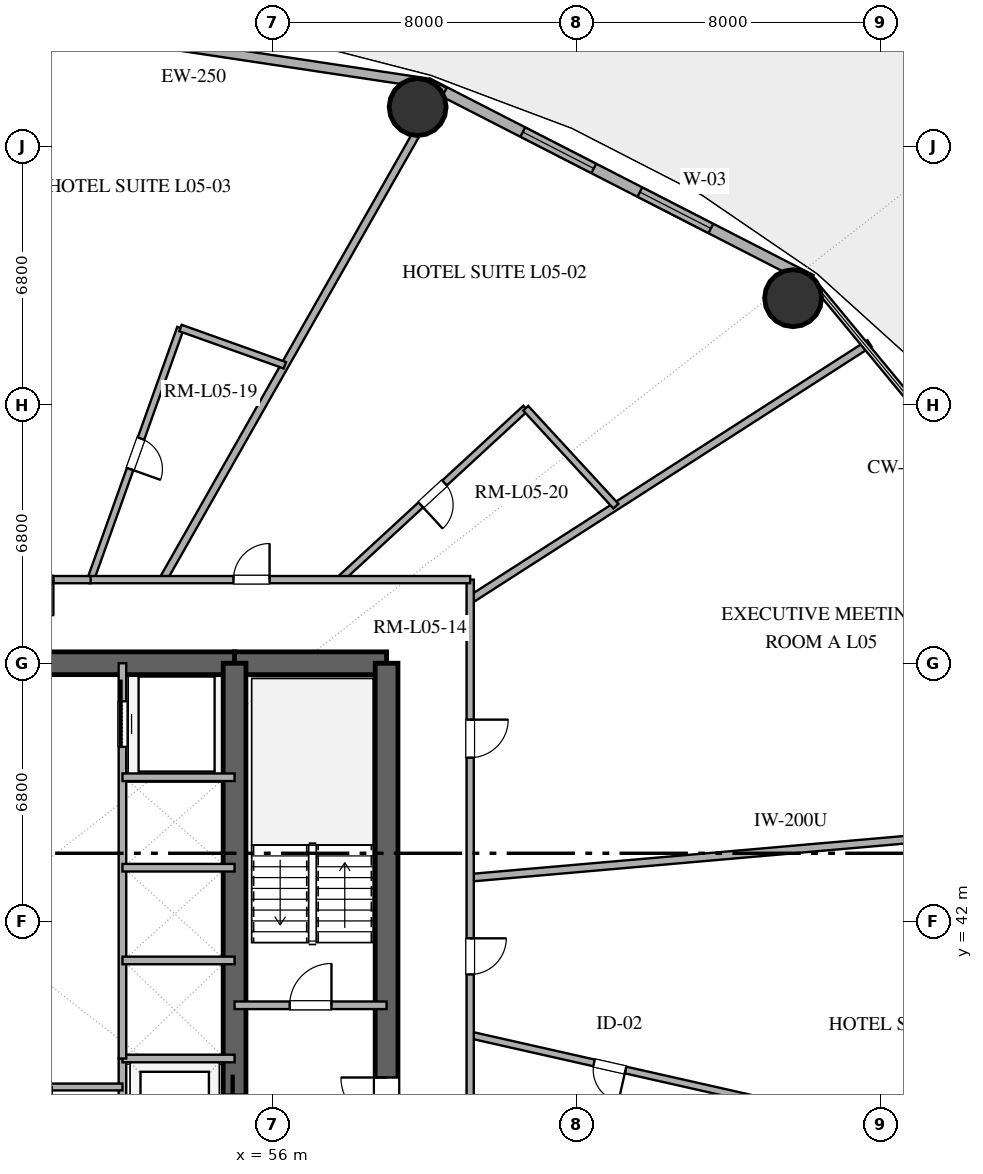
"""IFC4 building model, lengths in metres.
Left out: names, types, materials, properties, quantities, classifications, styles, units other than length and angle.
Written with IfcOpenShell. Run it as: python <this file> out.ifc"""

import sys

from ifc_helpers import new_model, si_unit, direction, frame, frame_2d, origin, origin_2d, place, context, subcontext, project, spatial, rectangle, hollow_circle, extrude, element, fill, save


model = new_model("IFC4")
c1 = context("Model", 3, precision=1e-05, world=origin(), true_north=direction((0.0, 1.0)))
c2 = subcontext(c1, "Body", "Model", "MODEL_VIEW")
j1 = project(units=[si_unit("LENGTHUNIT", "METRE"), si_unit("PLANEANGLEUNIT", "RADIAN")], contexts=[c1])
p1 = place(None, origin())
s1 = spatial("IfcSite", under=j1, at=p1, CompositionType="ELEMENT")
p2 = place(p1, origin())
s2 = spatial("IfcBuilding", under=s1, at=p2, CompositionType="ELEMENT")
p3 = place(p2, frame((0.0, 0.0, 28.2)))
s3 = spatial("IfcBuildingStorey", under=s2, at=p3, CompositionType="ELEMENT", Elevation=28.2)
p4 = place(p3, frame((41.0, 48.8, 0.0), z_axis=(0.0, 0.0, 1.0), x_axis=(1.0, 0.0, 0.0)))
e1 = element("IfcWall", 1, at=p4, inside=s3, PredefinedType="SHEAR", context=c2, shape_type="SweptSolid", body=[
    extrude(rectangle(XDim=14.0, YDim=0.6, at=frame_2d((7.0, 0.0))), origin(), (0.0, 0.0, 1.0), 3.38),
])
p5 = place(p4, frame((6.1, 0.0, 0.0)))
e2 = element("IfcOpeningElement", 2, at=p5, cuts=e1, PredefinedType="OPENING", context=c2, shape_type="SweptSolid", body=[
    extrude(rectangle(XDim=1.8, YDim=2.25, at=frame_2d((0.9, 1.125))), frame((0.0, 0.31, 0.0), z_axis=(0.0, -1.0, 0.0), x_axis=(1.0, 0.0, 0.0)), (0.0, 0.0, 1.0), 0.62),
])
p6 = place(p3, frame((55.0, 48.8, 0.0), z_axis=(0.0, 0.0, 1.0), x_axis=(1.0, 0.0, 0.0)))
e3 = element("IfcWall", 3, at=p6, inside=s3, PredefinedType="SHEAR", context=c2, shape_type="SweptSolid", body=[
    extrude(rectangle(XDim=4.0, YDim=0.6, at=frame_2d((2.0, 0.0))), origin(), (0.0, 0.0, 1.0), 3.38),
])
p7 = place(p3, frame((59.0, 35.2, 0.0), z_axis=(0.0, 0.0, 1.0), x_axis=(0.0, 1.0, 0.0)))
e4 = element("IfcWall", 4, at=p7, inside=s3, PredefinedType="SHEAR", context=c2, shape_type="SweptSolid", body=[
    extrude(rectangle(XDim=13.6, YDim=0.6, at=frame_2d((6.8, 0.0))), origin(), (0.0, 0.0, 1.0), 3.38),
])
p8 = place(p7, frame((1.5, 0.0, 0.0)))
e5 = element("IfcOpeningElement", 5, at=p8, cuts=e4, PredefinedType="OPENING", context=c2, shape_type="SweptSolid", body=[
    extrude(rectangle(XDim=1.2, YDim=2.15, at=frame_2d((0.6, 1.075))), frame((0.0, 0.31, 0.0), z_axis=(0.0, -1.0, 0.0), x_axis=(1.0, 0.0, 0.0)), (0.0, 0.0, 1.0), 0.62),
])
p9 = place(p3, frame((55.0, 35.2, 0.0), z_axis=(0.0, 0.0, 1.0), x_axis=(0.0, 1.0, 0.0)))
e6 = element("IfcWall", 6, at=p9, inside=s3, PredefinedType="SHEAR", context=c2, shape_type="SweptSolid", body=[
    extrude(rectangle(XDim=13.6, YDim=0.6, at=frame_2d((6.8, 0.0))), origin(), (0.0, 0.0, 1.0), 3.38),
])
p10 = place(p9, frame((1.15, 0.0, 0.0)))
e7 = element("IfcOpeningElement", 7, at=p10, cuts=e6, PredefinedType="OPENING", context=c2, shape_type="SweptSolid", body=[
    extrude(rectangle(XDim=1.1, YDim=2.2, at=frame_2d((0.55, 1.1))), frame((0.0, 0.31, 0.0), z_axis=(0.0, -1.0, 0.0), x_axis=(1.0, 0.0, 0.0)), (0.0, 0.0, 1.0), 0.62),
])
for number, where, z_axis, x_axis in (
    (8, (69.697, 58.405, 0.0), (0.0, 0.0, 1.0), (1.0, 0.0, 0.0)),
    (9, (59.818, 63.434, 0.0), (0.0, 0.0, 1.0), (1.0, 0.0, 0.0)),
):
    element("IfcColumn", number, at=place(p3, frame(where, z_axis=z_axis, x_axis=x_axis)), inside=s3, PredefinedType="COLUMN", context=c2, shape_type="SweptSolid", body=[
        extrude(hollow_circle(Radius=0.75, WallThickness=0.04, at=origin_2d()), origin(), (0.0, 0.0, 1.0), 3.38),
    ])
p11 = place(p3, frame((70.174, 58.886, 0.0), z_axis=(0.0, 0.0, 1.0), x_axis=(-0.889853976658, 0.456245438581, 0.0)))
e10 = element("IfcWall", 10, at=p11, inside=s3, PredefinedType="SOLIDWALL", context=c2, shape_type="SweptSolid", body=[
    extrude(rectangle(XDim=11.346, YDim=0.28, at=frame_2d((5.673, 0.0))), origin(), (0.0, 0.0, 1.0), 3.38),
])
p12 = place(p11, frame((2.967, 0.0, 0.85)))
e11 = element("IfcOpeningElement", 11, at=p12, cuts=e10, PredefinedType="OPENING", context=c2, shape_type="SweptSolid", body=[
    extrude(rectangle(XDim=2.1, YDim=2.2, at=frame_2d((1.05, 1.1))), frame((0.0, 0.15, 0.0), z_axis=(0.0, -1.0, 0.0), x_axis=(1.0, 0.0, 0.0)), (0.0, 0.0, 1.0), 0.3),
])
p13 = place(p11, frame((6.429, 0.0, 0.85)))
e12 = element("IfcOpeningElement", 12, at=p13, cuts=e10, PredefinedType="OPENING", context=c2, shape_type="SweptSolid", body=[
    extrude(rectangle(XDim=2.1, YDim=2.2, at=frame_2d((1.05, 1.1))), frame((0.0, 0.15, 0.0), z_axis=(0.0, -1.0, 0.0), x_axis=(1.0, 0.0, 0.0)), (0.0, 0.0, 1.0), 0.3),
])
p14 = place(p3, frame((60.078, 64.062, 0.0), z_axis=(0.0, 0.0, 1.0), x_axis=(-0.988864835849, 0.148816452121, 0.0)))
e13 = element("IfcWall", 13, at=p14, inside=s3, PredefinedType="SOLIDWALL", context=c2, shape_type="SweptSolid", body=[
    extrude(rectangle(XDim=12.214, YDim=0.25, at=frame_2d((6.107, 0.0))), origin(), (0.0, 0.0, 1.0), 3.38),
])
p15 = place(p14, frame((8.195, 0.0, 1.42)))
e14 = element("IfcOpeningElement", 14, at=p15, cuts=e13, PredefinedType="OPENING", context=c2, shape_type="SweptSolid", body=[
    extrude(rectangle(XDim=1.0, YDim=1.05, at=frame_2d((0.5, 0.525))), frame((0.0, 0.135, 0.0), z_axis=(0.0, -1.0, 0.0), x_axis=(1.0, 0.0, 0.0)), (0.0, 0.0, 1.0), 0.27),
])
p16 = place(p3, frame((55.0, 39.8, 0.0), z_axis=(0.0, 0.0, 1.0), x_axis=(1.0, 0.0, 0.0)))
e15 = element("IfcWall", 15, at=p16, inside=s3, PredefinedType="SOLIDWALL", context=c2, shape_type="SweptSolid", body=[
    extrude(rectangle(XDim=4.0, YDim=0.2, at=frame_2d((2.0, 0.0))), origin(), (0.0, 0.0, 1.0), 2.74),
])
p17 = place(p16, frame((1.45, 0.0, 0.0)))
e16 = element("IfcOpeningElement", 16, at=p17, cuts=e15, PredefinedType="OPENING", context=c2, shape_type="SweptSolid", body=[
    extrude(rectangle(XDim=1.1, YDim=2.15, at=frame_2d((0.55, 1.075))), frame((0.0, 0.11, 0.0), z_axis=(0.0, -1.0, 0.0), x_axis=(1.0, 0.0, 0.0)), (0.0, 0.0, 1.0), 0.22),
])
p18 = place(p3, frame((52.05, 35.2, 0.0), z_axis=(0.0, 0.0, 1.0), x_axis=(0.0, 1.0, 0.0)))
e17 = element("IfcWall", 17, at=p18, inside=s3, PredefinedType="SOLIDWALL", context=c2, shape_type="SweptSolid", body=[
    extrude(rectangle(XDim=3.2, YDim=0.2, at=frame_2d((1.6, 0.0))), origin(), (0.0, 0.0, 1.0), 2.74),
])
p19 = place(p3, frame((52.05, 38.4, 0.0), z_axis=(0.0, 0.0, 1.0), x_axis=(1.0, 0.0, 0.0)))
e18 = element("IfcWall", 18, at=p19, inside=s3, PredefinedType="SOLIDWALL", context=c2, shape_type="SweptSolid", body=[
    extrude(rectangle(XDim=2.95, YDim=0.2, at=frame_2d((1.475, 0.0))), origin(), (0.0, 0.0, 1.0), 2.74),
])
p20 = place(p3, frame((52.05, 38.4, 0.0), z_axis=(0.0, 0.0, 1.0), x_axis=(0.0, 1.0, 0.0)))
e19 = element("IfcWall", 19, at=p20, inside=s3, PredefinedType="SOLIDWALL", context=c2, shape_type="SweptSolid", body=[
    extrude(rectangle(XDim=10.4, YDim=0.2, at=frame_2d((5.2, 0.0))), origin(), (0.0, 0.0, 1.0), 2.74),
])
p21 = place(p20, frame((8.2, 0.0, 0.0)))
e20 = element("IfcOpeningElement", 20, at=p21, cuts=e19, PredefinedType="OPENING", context=c2, shape_type="SweptSolid", body=[
    extrude(rectangle(XDim=1.2, YDim=2.2, at=frame_2d((0.6, 1.1))), frame((0.0, 0.11, 0.0), z_axis=(0.0, -1.0, 0.0), x_axis=(1.0, 0.0, 0.0)), (0.0, 0.0, 1.0), 0.22),
])
for number, where, z_axis, x_axis in (
    (21, (52.05, 40.98, 0.0), (0.0, 0.0, 1.0), (1.0, 0.0, 0.0)),
    (22, (52.05, 43.42, 0.0), (0.0, 0.0, 1.0), (1.0, 0.0, 0.0)),
    (23, (52.05, 45.8, 0.0), (0.0, 0.0, 1.0), (1.0, 0.0, 0.0)),
):
    element("IfcWall", number, at=place(p3, frame(where, z_axis=z_axis, x_axis=x_axis)), inside=s3, PredefinedType="SOLIDWALL", context=c2, shape_type="SweptSolid", body=[
        extrude(rectangle(XDim=2.95, YDim=0.2, at=frame_2d((1.475, 0.0))), origin(), (0.0, 0.0, 1.0), 2.74),
    ])
p22 = place(p3, frame((50.1, 37.65, 0.0), z_axis=(0.0, 0.0, 1.0), x_axis=(1.0, 0.0, 0.0)))
e24 = element("IfcWall", 24, at=p22, inside=s3, PredefinedType="PLUMBINGWALL", context=c2, shape_type="SweptSolid", body=[
    extrude(rectangle(XDim=1.95, YDim=0.18, at=frame_2d((0.975, 0.0))), origin(), (0.0, 0.0, 1.0), 2.74),
])
p23 = place(p3, frame((61.2, 43.155, 0.0), z_axis=(0.0, 0.0, 1.0), x_axis=(0.996194943742, 0.087152934912, 0.0)))
e25 = element("IfcWall", 25, at=p23, inside=s3, PredefinedType="PARTITIONING", context=c2, shape_type="SweptSolid", body=[
    extrude(rectangle(XDim=17.071, YDim=0.2, at=frame_2d((8.536, 0.0))), origin(), (0.0, 0.0, 1.0), 2.74),
])
p24 = place(p3, frame((53.116, 51.0, 0.0), z_axis=(0.0, 0.0, 1.0), x_axis=(0.494167535405, 0.869366693031, 0.0)))
e26 = element("IfcWall", 26, at=p24, inside=s3, PredefinedType="PARTITIONING", context=c2, shape_type="SweptSolid", body=[
    extrude(rectangle(XDim=14.934, YDim=0.2, at=frame_2d((7.467, 0.0))), origin(), (0.0, 0.0, 1.0), 2.74),
])
p25 = place(p3, frame((61.2, 50.472, 0.0), z_axis=(0.0, 0.0, 1.0), x_axis=(0.841576538847, 0.540137879863, 0.0)))
e27 = element("IfcWall", 27, at=p25, inside=s3, PredefinedType="PARTITIONING", context=c2, shape_type="SweptSolid", body=[
    extrude(rectangle(XDim=12.487, YDim=0.2, at=frame_2d((6.244, 0.0))), origin(), (0.0, 0.0, 1.0), 2.74),
])
p26 = place(p3, frame((68.547, 37.361, 0.0), z_axis=(0.0, 0.0, 1.0), x_axis=(-0.975442349969, 0.220254902072, 0.0)))
e28 = element("IfcWall", 28, at=p26, inside=s3, PredefinedType="PLUMBINGWALL", context=c2, shape_type="SweptSolid", body=[
    extrude(rectangle(XDim=7.532, YDim=0.18, at=frame_2d((3.766, 0.0))), origin(), (0.0, 0.0, 1.0), 2.74),
])
p27 = place(p26, frame((3.341, 0.0, 0.0)))
e29 = element("IfcOpeningElement", 29, at=p27, cuts=e28, PredefinedType="OPENING", context=c2, shape_type="SweptSolid", body=[
    extrude(rectangle(XDim=0.85, YDim=2.1, at=frame_2d((0.425, 1.05))), frame((0.0, 0.1, 0.0), z_axis=(0.0, -1.0, 0.0), x_axis=(1.0, 0.0, 0.0)), (0.0, 0.0, 1.0), 0.2),
])
p28 = place(p3, frame((61.2, 51.0, 0.0), z_axis=(0.0, 0.0, 1.0), x_axis=(0.0, -1.0, 0.0)))
e30 = element("IfcWall", 30, at=p28, inside=s3, PredefinedType="PARTITIONING", context=c2, shape_type="SweptSolid", body=[
    extrude(rectangle(XDim=14.554, YDim=0.19, at=frame_2d((7.277, 0.0))), origin(), (0.0, 0.0, 1.0), 2.74),
])
p29 = place(p28, frame((3.684, 0.0, 0.0)))
e31 = element("IfcOpeningElement", 31, at=p29, cuts=e30, PredefinedType="OPENING", context=c2, shape_type="SweptSolid", body=[
    extrude(rectangle(XDim=1.0, YDim=2.2, at=frame_2d((0.5, 1.1))), frame((0.0, 0.105, 0.0), z_axis=(0.0, -1.0, 0.0), x_axis=(1.0, 0.0, 0.0)), (0.0, 0.0, 1.0), 0.21),
])
p30 = place(p28, frame((9.438, 0.0, 0.0)))
e32 = element("IfcOpeningElement", 32, at=p30, cuts=e30, PredefinedType="OPENING", context=c2, shape_type="SweptSolid", body=[
    extrude(rectangle(XDim=0.95, YDim=2.15, at=frame_2d((0.475, 1.075))), frame((0.0, 0.105, 0.0), z_axis=(0.0, -1.0, 0.0), x_axis=(1.0, 0.0, 0.0)), (0.0, 0.0, 1.0), 0.21),
])
p31 = place(p3, frame((53.576, 57.621, 0.0), z_axis=(0.0, 0.0, 1.0), x_axis=(-0.336213191961, -0.941785904307, 0.0)))
e33 = element("IfcWall", 33, at=p31, inside=s3, PredefinedType="PLUMBINGWALL", context=c2, shape_type="SweptSolid", body=[
    extrude(rectangle(XDim=7.03, YDim=0.18, at=frame_2d((3.515, 0.0))), origin(), (0.0, 0.0, 1.0), 2.74),
])
p32 = place(p31, frame((3.09, 0.0, 0.0)))
e34 = element("IfcOpeningElement", 34, at=p32, cuts=e33, PredefinedType="OPENING", context=c2, shape_type="SweptSolid", body=[
    extrude(rectangle(XDim=0.85, YDim=2.1, at=frame_2d((0.425, 1.05))), frame((0.0, 0.1, 0.0), z_axis=(0.0, -1.0, 0.0), x_axis=(1.0, 0.0, 0.0)), (0.0, 0.0, 1.0), 0.2),
])
p33 = place(p3, frame((62.66, 55.51, 0.0), z_axis=(0.0, 0.0, 1.0), x_axis=(-0.735369975398, -0.67766584633, 0.0)))
e35 = element("IfcWall", 35, at=p33, inside=s3, PredefinedType="PLUMBINGWALL", context=c2, shape_type="SweptSolid", body=[
    extrude(rectangle(XDim=6.655, YDim=0.18, at=frame_2d((3.328, 0.0))), origin(), (0.0, 0.0, 1.0), 2.74),
])
p34 = place(p33, frame((2.903, 0.0, 0.0)))
e36 = element("IfcOpeningElement", 36, at=p34, cuts=e35, PredefinedType="OPENING", context=c2, shape_type="SweptSolid", body=[
    extrude(rectangle(XDim=0.85, YDim=2.1, at=frame_2d((0.425, 1.05))), frame((0.0, 0.1, 0.0), z_axis=(0.0, -1.0, 0.0), x_axis=(1.0, 0.0, 0.0)), (0.0, 0.0, 1.0), 0.2),
])
p35 = place(p3, frame((51.179, 51.0, 0.0), z_axis=(0.0, 0.0, 1.0), x_axis=(1.0, 0.0, 0.0)))
e37 = element("IfcWall", 37, at=p35, inside=s3, PredefinedType="PARTITIONING", context=c2, shape_type="SweptSolid", body=[
    extrude(rectangle(XDim=10.021, YDim=0.19, at=frame_2d((5.01, 0.0))), origin(), (0.0, 0.0, 1.0), 2.74),
])
p36 = place(p35, frame((3.792, 0.0, 0.0)))
e38 = element("IfcOpeningElement", 38, at=p36, cuts=e37, PredefinedType="OPENING", context=c2, shape_type="SweptSolid", body=[
    extrude(rectangle(XDim=0.95, YDim=2.15, at=frame_2d((0.475, 1.075))), frame((0.0, 0.105, 0.0), z_axis=(0.0, -1.0, 0.0), x_axis=(1.0, 0.0, 0.0)), (0.0, 0.0, 1.0), 0.21),
])
p37 = place(p3, frame((65.035, 52.933, 0.0), z_axis=(0.0, 0.0, 1.0), x_axis=(-0.677675106239, 0.735361442002, 0.0)))
e39 = element("IfcWall", 39, at=p37, inside=s3, PredefinedType="PLUMBINGWALL", context=c2, shape_type="SweptSolid", body=[
    extrude(rectangle(XDim=3.504, YDim=0.18, at=frame_2d((1.752, 0.0))), origin(), (0.0, 0.0, 1.0), 2.74),
])
p38 = place(p3, frame((56.322, 56.64, 0.0), z_axis=(0.0, 0.0, 1.0), x_axis=(-0.94177979862, 0.336230294457, 0.0)))
e40 = element("IfcWall", 40, at=p38, inside=s3, PredefinedType="PLUMBINGWALL", context=c2, shape_type="SweptSolid", body=[
    extrude(rectangle(XDim=2.915, YDim=0.18, at=frame_2d((1.458, 0.0))), origin(), (0.0, 0.0, 1.0), 2.74),
])
p39 = place(p3, frame((51.213, 51.0, 0.0), z_axis=(0.0, 0.0, 1.0), x_axis=(-1.0, 0.0, 0.0)))
e41 = element("IfcWall", 41, at=p39, inside=s3, PredefinedType="PARTITIONING", context=c2, shape_type="SweptSolid", body=[
    extrude(rectangle(XDim=2.911, YDim=0.19, at=frame_2d((1.455, 0.0))), origin(), (0.0, 0.0, 1.0), 2.74),
])
p40 = place(p39, frame((0.98, 0.0, 0.0)))
e42 = element("IfcOpeningElement", 42, at=p40, cuts=e41, PredefinedType="OPENING", context=c2, shape_type="SweptSolid", body=[
    extrude(rectangle(XDim=0.95, YDim=2.15, at=frame_2d((0.475, 1.075))), frame((0.0, 0.105, 0.0), z_axis=(0.0, -1.0, 0.0), x_axis=(1.0, 0.0, 0.0)), (0.0, 0.0, 1.0), 0.21),
])
p41 = place(p12, origin())
e43 = element("IfcWindow", 43, at=p41, inside=s3, PartitioningType="SINGLE_PANEL", PredefinedType="WINDOW", context=c2, shape_type="SweptSolid", body=[
    extrude(rectangle(XDim=2.1, YDim=2.2, at=frame_2d((1.05, 1.1))), frame((0.0, 0.03, 0.0), z_axis=(0.0, -1.0, 0.0), x_axis=(1.0, 0.0, 0.0)), (0.0, 0.0, 1.0), 0.06),
])
fill(e11, e43)
p42 = place(p13, origin())
e44 = element("IfcWindow", 44, at=p42, inside=s3, PartitioningType="SINGLE_PANEL", PredefinedType="WINDOW", context=c2, shape_type="SweptSolid", body=[
    extrude(rectangle(XDim=2.1, YDim=2.2, at=frame_2d((1.05, 1.1))), frame((0.0, 0.03, 0.0), z_axis=(0.0, -1.0, 0.0), x_axis=(1.0, 0.0, 0.0)), (0.0, 0.0, 1.0), 0.06),
])
fill(e12, e44)
p43 = place(p8, origin())
e45 = element("IfcDoor", 45, at=p43, inside=s3, OperationType="SINGLE_SWING_RIGHT", PredefinedType="DOOR", context=c2, shape_type="SweptSolid", body=[
    extrude(rectangle(XDim=1.2, YDim=2.15, at=frame_2d((0.6, 1.075))), frame((0.0, 0.025, 0.0), z_axis=(0.0, -1.0, 0.0), x_axis=(1.0, 0.0, 0.0)), (0.0, 0.0, 1.0), 0.05),
])
fill(e5, e45)
p44 = place(p17, origin())
e46 = element("IfcDoor", 46, at=p44, inside=s3, OperationType="SINGLE_SWING_RIGHT", PredefinedType="DOOR", context=c2, shape_type="SweptSolid", body=[
    extrude(rectangle(XDim=1.1, YDim=2.15, at=frame_2d((0.55, 1.075))), frame((0.0, 0.025, 0.0), z_axis=(0.0, -1.0, 0.0), x_axis=(1.0, 0.0, 0.0)), (0.0, 0.0, 1.0), 0.05),
])
fill(e16, e46)
p45 = place(p21, origin())
e47 = element("IfcDoor", 47, at=p45, inside=s3, OperationType="SLIDING_TO_RIGHT", PredefinedType="DOOR", context=c2, shape_type="SweptSolid", body=[
    extrude(rectangle(XDim=1.2, YDim=2.2, at=frame_2d((0.6, 1.1))), frame((0.0, 0.025, 0.0), z_axis=(0.0, -1.0, 0.0), x_axis=(1.0, 0.0, 0.0)), (0.0, 0.0, 1.0), 0.05),
])
fill(e20, e47)
p46 = place(p27, origin())
e48 = element("IfcDoor", 48, at=p46, inside=s3, OperationType="SINGLE_SWING_LEFT", PredefinedType="DOOR", context=c2, shape_type="SweptSolid", body=[
    extrude(rectangle(XDim=0.85, YDim=2.1, at=frame_2d((0.425, 1.05))), frame((0.0, 0.025, 0.0), z_axis=(0.0, -1.0, 0.0), x_axis=(1.0, 0.0, 0.0)), (0.0, 0.0, 1.0), 0.05),
])
fill(e29, e48)
p47 = place(p29, origin())
e49 = element("IfcDoor", 49, at=p47, inside=s3, OperationType="SINGLE_SWING_LEFT", PredefinedType="DOOR", context=c2, shape_type="SweptSolid", body=[
    extrude(rectangle(XDim=1.0, YDim=2.2, at=frame_2d((0.5, 1.1))), frame((0.0, 0.025, 0.0), z_axis=(0.0, -1.0, 0.0), x_axis=(1.0, 0.0, 0.0)), (0.0, 0.0, 1.0), 0.05),
])
fill(e31, e49)
p48 = place(p30, origin())
e50 = element("IfcDoor", 50, at=p48, inside=s3, OperationType="SINGLE_SWING_LEFT", PredefinedType="DOOR", context=c2, shape_type="SweptSolid", body=[
    extrude(rectangle(XDim=0.95, YDim=2.15, at=frame_2d((0.475, 1.075))), frame((0.0, 0.025, 0.0), z_axis=(0.0, -1.0, 0.0), x_axis=(1.0, 0.0, 0.0)), (0.0, 0.0, 1.0), 0.05),
])
fill(e32, e50)
p49 = place(p32, origin())
e51 = element("IfcDoor", 51, at=p49, inside=s3, OperationType="SINGLE_SWING_RIGHT", PredefinedType="DOOR", context=c2, shape_type="SweptSolid", body=[
    extrude(rectangle(XDim=0.85, YDim=2.1, at=frame_2d((0.425, 1.05))), frame((0.0, 0.025, 0.0), z_axis=(0.0, -1.0, 0.0), x_axis=(1.0, 0.0, 0.0)), (0.0, 0.0, 1.0), 0.05),
])
fill(e34, e51)
p50 = place(p34, origin())
e52 = element("IfcDoor", 52, at=p50, inside=s3, OperationType="SINGLE_SWING_RIGHT", PredefinedType="DOOR", context=c2, shape_type="SweptSolid", body=[
    extrude(rectangle(XDim=0.85, YDim=2.1, at=frame_2d((0.425, 1.05))), frame((0.0, 0.025, 0.0), z_axis=(0.0, -1.0, 0.0), x_axis=(1.0, 0.0, 0.0)), (0.0, 0.0, 1.0), 0.05),
])
fill(e36, e52)
p51 = place(p36, origin())
e53 = element("IfcDoor", 53, at=p51, inside=s3, OperationType="SINGLE_SWING_RIGHT", PredefinedType="DOOR", context=c2, shape_type="SweptSolid", body=[
    extrude(rectangle(XDim=0.95, YDim=2.15, at=frame_2d((0.475, 1.075))), frame((0.0, 0.025, 0.0), z_axis=(0.0, -1.0, 0.0), x_axis=(1.0, 0.0, 0.0)), (0.0, 0.0, 1.0), 0.05),
])
fill(e38, e53)
p52 = place(p40, origin())
e54 = element("IfcDoor", 54, at=p52, inside=s3, OperationType="SINGLE_SWING_LEFT", PredefinedType="DOOR", context=c2, shape_type="SweptSolid", body=[
    extrude(rectangle(XDim=0.95, YDim=2.15, at=frame_2d((0.475, 1.075))), frame((0.0, 0.025, 0.0), z_axis=(0.0, -1.0, 0.0), x_axis=(1.0, 0.0, 0.0)), (0.0, 0.0, 1.0), 0.05),
])
fill(e42, e54)
save(model, sys.argv[1])
